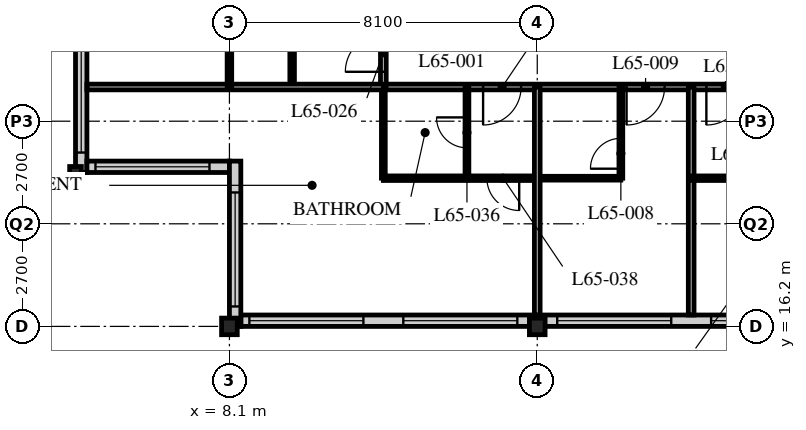
"""IFC4 building model, lengths in metres.
Left out: names, types, materials, properties, quantities, classifications, styles, units other than length and angle.
Written with IfcOpenShell. Run it as: python <this file> out.ifc"""

import sys

from ifc_helpers import new_model, si_unit, direction, frame, frame_2d, origin, origin_2d, place, context, subcontext, project, spatial, rectangle, i_section, extrude, element, fill, save


model = new_model("IFC4")
c1 = context("Model", 3, precision=1e-05, world=origin(), true_north=direction((0.0, 1.0)))
c2 = subcontext(c1, "Body", "Model", "MODEL_VIEW")
j1 = project(units=[si_unit("LENGTHUNIT", "METRE"), si_unit("PLANEANGLEUNIT", "RADIAN")], contexts=[c1])
p1 = place(None, origin())
s1 = spatial("IfcSite", under=j1, at=p1, CompositionType="ELEMENT")
p2 = place(p1, origin())
s2 = spatial("IfcBuilding", under=s1, at=p2, CompositionType="ELEMENT")
p3 = place(p2, frame((0.0, 0.0, 254.1)))
s3 = spatial("IfcBuildingStorey", under=s2, at=p3, CompositionType="ELEMENT", Elevation=254.1)
p4 = place(p3, frame((4.05, 20.25, 0.0), z_axis=(0.0, 0.0, 1.0), x_axis=(1.0, 0.0, 0.0)))
e1 = element("IfcColumn", 1, at=p4, inside=s3, PredefinedType="COLUMN", context=c2, shape_type="SweptSolid", body=[
    extrude(i_section(OverallWidth=0.307, OverallDepth=0.314, WebThickness=0.012, FlangeThickness=0.019, FilletRadius=0.015, at=origin_2d()), origin(), (0.0, 0.0, 1.0), 3.9),
])
for number, where, z_axis, x_axis in (
    (2, (8.1, 16.2, 0.0), (0.0, 0.0, 1.0), (1.0, 0.0, 0.0)),
    (3, (16.2, 16.2, 0.0), (0.0, 0.0, 1.0), (1.0, 0.0, 0.0)),
):
    element("IfcColumn", number, at=place(p3, frame(where, z_axis=z_axis, x_axis=x_axis)), inside=s3, PredefinedType="COLUMN", context=c2, shape_type="SweptSolid", body=[
        extrude(i_section(OverallWidth=0.412, OverallDepth=0.437, WebThickness=0.036, FlangeThickness=0.058, FilletRadius=0.015, at=origin_2d()), origin(), (0.0, 0.0, 1.0), 3.9),
    ])
p5 = place(p3, frame((8.4, 16.35, 0.0), z_axis=(0.0, 0.0, 1.0), x_axis=(1.0, 0.0, 0.0)))
e4 = element("IfcWall", 4, at=p5, inside=s3, PredefinedType="SOLIDWALL", context=c2, shape_type="SweptSolid", body=[
    extrude(rectangle(XDim=40.2, YDim=0.3, at=frame_2d((20.1, 0.0))), origin(), (0.0, 0.0, 1.0), 3.69),
])
p6 = place(p5, frame((0.225, 0.0, 0.6)))
e5 = element("IfcOpeningElement", 5, at=p6, cuts=e4, PredefinedType="OPENING", context=c2, shape_type="SweptSolid", body=[
    extrude(rectangle(XDim=3.0, YDim=2.4, at=frame_2d((1.5, 1.2))), frame((0.0, 0.16, 0.0), z_axis=(0.0, -1.0, 0.0), x_axis=(1.0, 0.0, 0.0)), (0.0, 0.0, 1.0), 0.32),
])
p7 = place(p5, frame((4.275, 0.0, 0.6)))
e6 = element("IfcOpeningElement", 6, at=p7, cuts=e4, PredefinedType="OPENING", context=c2, shape_type="SweptSolid", body=[
    extrude(rectangle(XDim=3.0, YDim=2.4, at=frame_2d((1.5, 1.2))), frame((0.0, 0.16, 0.0), z_axis=(0.0, -1.0, 0.0), x_axis=(1.0, 0.0, 0.0)), (0.0, 0.0, 1.0), 0.32),
])
p8 = place(p5, frame((8.325, 0.0, 0.6)))
e7 = element("IfcOpeningElement", 7, at=p8, cuts=e4, PredefinedType="OPENING", context=c2, shape_type="SweptSolid", body=[
    extrude(rectangle(XDim=3.0, YDim=2.4, at=frame_2d((1.5, 1.2))), frame((0.0, 0.16, 0.0), z_axis=(0.0, -1.0, 0.0), x_axis=(1.0, 0.0, 0.0)), (0.0, 0.0, 1.0), 0.32),
])
p9 = place(p5, frame((12.375, 0.0, 0.6)))
e8 = element("IfcOpeningElement", 8, at=p9, cuts=e4, PredefinedType="OPENING", context=c2, shape_type="SweptSolid", body=[
    extrude(rectangle(XDim=3.0, YDim=2.4, at=frame_2d((1.5, 1.2))), frame((0.0, 0.16, 0.0), z_axis=(0.0, -1.0, 0.0), x_axis=(1.0, 0.0, 0.0)), (0.0, 0.0, 1.0), 0.32),
])
p10 = place(p5, frame((16.425, 0.0, 0.6)))
e9 = element("IfcOpeningElement", 9, at=p10, cuts=e4, PredefinedType="OPENING", context=c2, shape_type="SweptSolid", body=[
    extrude(rectangle(XDim=3.0, YDim=2.4, at=frame_2d((1.5, 1.2))), frame((0.0, 0.16, 0.0), z_axis=(0.0, -1.0, 0.0), x_axis=(1.0, 0.0, 0.0)), (0.0, 0.0, 1.0), 0.32),
])
p11 = place(p5, frame((20.475, 0.0, 0.6)))
e10 = element("IfcOpeningElement", 10, at=p11, cuts=e4, PredefinedType="OPENING", context=c2, shape_type="SweptSolid", body=[
    extrude(rectangle(XDim=3.0, YDim=2.4, at=frame_2d((1.5, 1.2))), frame((0.0, 0.16, 0.0), z_axis=(0.0, -1.0, 0.0), x_axis=(1.0, 0.0, 0.0)), (0.0, 0.0, 1.0), 0.32),
])
p12 = place(p5, frame((24.525, 0.0, 0.6)))
e11 = element("IfcOpeningElement", 11, at=p12, cuts=e4, PredefinedType="OPENING", context=c2, shape_type="SweptSolid", body=[
    extrude(rectangle(XDim=3.0, YDim=2.4, at=frame_2d((1.5, 1.2))), frame((0.0, 0.16, 0.0), z_axis=(0.0, -1.0, 0.0), x_axis=(1.0, 0.0, 0.0)), (0.0, 0.0, 1.0), 0.32),
])
p13 = place(p5, frame((28.575, 0.0, 0.6)))
e12 = element("IfcOpeningElement", 12, at=p13, cuts=e4, PredefinedType="OPENING", context=c2, shape_type="SweptSolid", body=[
    extrude(rectangle(XDim=3.0, YDim=2.4, at=frame_2d((1.5, 1.2))), frame((0.0, 0.16, 0.0), z_axis=(0.0, -1.0, 0.0), x_axis=(1.0, 0.0, 0.0)), (0.0, 0.0, 1.0), 0.32),
])
p14 = place(p5, frame((32.625, 0.0, 0.6)))
e13 = element("IfcOpeningElement", 13, at=p14, cuts=e4, PredefinedType="OPENING", context=c2, shape_type="SweptSolid", body=[
    extrude(rectangle(XDim=3.0, YDim=2.4, at=frame_2d((1.5, 1.2))), frame((0.0, 0.16, 0.0), z_axis=(0.0, -1.0, 0.0), x_axis=(1.0, 0.0, 0.0)), (0.0, 0.0, 1.0), 0.32),
])
p15 = place(p5, frame((36.675, 0.0, 0.6)))
e14 = element("IfcOpeningElement", 14, at=p15, cuts=e4, PredefinedType="OPENING", context=c2, shape_type="SweptSolid", body=[
    extrude(rectangle(XDim=3.0, YDim=2.4, at=frame_2d((1.5, 1.2))), frame((0.0, 0.16, 0.0), z_axis=(0.0, -1.0, 0.0), x_axis=(1.0, 0.0, 0.0)), (0.0, 0.0, 1.0), 0.32),
])
p16 = place(p3, frame((4.2, 24.6, 0.0), z_axis=(0.0, 0.0, 1.0), x_axis=(0.0, -1.0, 0.0)))
e15 = element("IfcWall", 15, at=p16, inside=s3, PredefinedType="SOLIDWALL", context=c2, shape_type="SweptSolid", body=[
    extrude(rectangle(XDim=4.35, YDim=0.3, at=frame_2d((2.175, 0.0))), origin(), (0.0, 0.0, 1.0), 3.69),
])
p17 = place(p16, frame((0.825, 0.0, 0.6)))
e16 = element("IfcOpeningElement", 16, at=p17, cuts=e15, PredefinedType="OPENING", context=c2, shape_type="SweptSolid", body=[
    extrude(rectangle(XDim=3.0, YDim=2.3, at=frame_2d((1.5, 1.15))), frame((0.0, 0.16, 0.0), z_axis=(0.0, -1.0, 0.0), x_axis=(1.0, 0.0, 0.0)), (0.0, 0.0, 1.0), 0.32),
])
p18 = place(p3, frame((4.35, 20.4, 0.0), z_axis=(0.0, 0.0, 1.0), x_axis=(1.0, 0.0, 0.0)))
e17 = element("IfcWall", 17, at=p18, inside=s3, PredefinedType="SOLIDWALL", context=c2, shape_type="SweptSolid", body=[
    extrude(rectangle(XDim=3.75, YDim=0.3, at=frame_2d((1.875, 0.0))), origin(), (0.0, 0.0, 1.0), 3.69),
])
p19 = place(p18, frame((0.225, 0.0, 0.6)))
e18 = element("IfcOpeningElement", 18, at=p19, cuts=e17, PredefinedType="OPENING", context=c2, shape_type="SweptSolid", body=[
    extrude(rectangle(XDim=3.0, YDim=2.3, at=frame_2d((1.5, 1.15))), frame((0.0, 0.16, 0.0), z_axis=(0.0, -1.0, 0.0), x_axis=(1.0, 0.0, 0.0)), (0.0, 0.0, 1.0), 0.32),
])
p20 = place(p3, frame((8.25, 20.55, 0.0), z_axis=(0.0, 0.0, 1.0), x_axis=(0.0, -1.0, 0.0)))
e19 = element("IfcWall", 19, at=p20, inside=s3, PredefinedType="SOLIDWALL", context=c2, shape_type="SweptSolid", body=[
    extrude(rectangle(XDim=4.35, YDim=0.3, at=frame_2d((2.175, 0.0))), origin(), (0.0, 0.0, 1.0), 3.69),
])
p21 = place(p20, frame((0.825, 0.0, 0.6)))
e20 = element("IfcOpeningElement", 20, at=p21, cuts=e19, PredefinedType="OPENING", context=c2, shape_type="SweptSolid", body=[
    extrude(rectangle(XDim=3.0, YDim=2.3, at=frame_2d((1.5, 1.15))), frame((0.0, 0.16, 0.0), z_axis=(0.0, -1.0, 0.0), x_axis=(1.0, 0.0, 0.0)), (0.0, 0.0, 1.0), 0.32),
])
p22 = place(p3, frame((12.15, 22.5, 0.0), z_axis=(0.0, 0.0, 1.0), x_axis=(1.0, 0.0, 0.0)))
e21 = element("IfcWall", 21, at=p22, inside=s3, PredefinedType="PARTITIONING", context=c2, shape_type="SweptSolid", body=[
    extrude(rectangle(XDim=24.3, YDim=0.15, at=frame_2d((12.15, 0.0))), origin(), (0.0, 0.0, 1.0), 3.69),
])
p23 = place(p22, frame((6.4, 0.0, 0.0)))
e22 = element("IfcOpeningElement", 22, at=p23, cuts=e21, PredefinedType="OPENING", context=c2, shape_type="SweptSolid", body=[
    extrude(rectangle(XDim=1.0, YDim=2.1, at=frame_2d((0.5, 1.05))), frame((0.0, 0.085, 0.0), z_axis=(0.0, -1.0, 0.0), x_axis=(1.0, 0.0, 0.0)), (0.0, 0.0, 1.0), 0.17),
])
p24 = place(p22, frame((8.5, 0.0, 0.0)))
e23 = element("IfcOpeningElement", 23, at=p24, cuts=e21, PredefinedType="OPENING", context=c2, shape_type="SweptSolid", body=[
    extrude(rectangle(XDim=1.0, YDim=2.1, at=frame_2d((0.5, 1.05))), frame((0.0, 0.085, 0.0), z_axis=(0.0, -1.0, 0.0), x_axis=(1.0, 0.0, 0.0)), (0.0, 0.0, 1.0), 0.17),
])
p25 = place(p22, frame((16.6, 0.0, 0.0)))
e24 = element("IfcOpeningElement", 24, at=p25, cuts=e21, PredefinedType="OPENING", context=c2, shape_type="SweptSolid", body=[
    extrude(rectangle(XDim=1.0, YDim=2.1, at=frame_2d((0.5, 1.05))), frame((0.0, 0.085, 0.0), z_axis=(0.0, -1.0, 0.0), x_axis=(1.0, 0.0, 0.0)), (0.0, 0.0, 1.0), 0.17),
])
p26 = place(p22, frame((2.625, 0.0, 0.0)))
e25 = element("IfcOpeningElement", 25, at=p26, cuts=e21, PredefinedType="OPENING", context=c2, shape_type="SweptSolid", body=[
    extrude(rectangle(XDim=1.0, YDim=2.1, at=frame_2d((0.5, 1.05))), frame((0.0, 0.085, 0.0), z_axis=(0.0, -1.0, 0.0), x_axis=(1.0, 0.0, 0.0)), (0.0, 0.0, 1.0), 0.17),
])
p27 = place(p3, frame((12.15, 22.5, 0.0), z_axis=(0.0, 0.0, 1.0), x_axis=(0.0, 1.0, 0.0)))
e26 = element("IfcWall", 26, at=p27, inside=s3, PredefinedType="PARTITIONING", context=c2, shape_type="SweptSolid", body=[
    extrude(rectangle(XDim=30.15, YDim=0.15, at=frame_2d((15.075, 0.0))), origin(), (0.0, 0.0, 1.0), 3.69),
])
p28 = place(p27, frame((0.4, 0.0, 0.0)))
e27 = element("IfcOpeningElement", 27, at=p28, cuts=e26, PredefinedType="OPENING", context=c2, shape_type="SweptSolid", body=[
    extrude(rectangle(XDim=1.0, YDim=2.1, at=frame_2d((0.5, 1.05))), frame((0.0, 0.085, 0.0), z_axis=(0.0, -1.0, 0.0), x_axis=(1.0, 0.0, 0.0)), (0.0, 0.0, 1.0), 0.17),
])
p29 = place(p27, frame((24.4, 0.0, 0.0)))
e28 = element("IfcOpeningElement", 28, at=p29, cuts=e26, PredefinedType="OPENING", context=c2, shape_type="SweptSolid", body=[
    extrude(rectangle(XDim=1.0, YDim=2.1, at=frame_2d((0.5, 1.05))), frame((0.0, 0.085, 0.0), z_axis=(0.0, -1.0, 0.0), x_axis=(1.0, 0.0, 0.0)), (0.0, 0.0, 1.0), 0.17),
])
p30 = place(p27, frame((28.45, 0.0, 0.0)))
e29 = element("IfcOpeningElement", 29, at=p30, cuts=e26, PredefinedType="OPENING", context=c2, shape_type="SweptSolid", body=[
    extrude(rectangle(XDim=1.0, YDim=2.1, at=frame_2d((0.5, 1.05))), frame((0.0, 0.085, 0.0), z_axis=(0.0, -1.0, 0.0), x_axis=(1.0, 0.0, 0.0)), (0.0, 0.0, 1.0), 0.17),
])
p31 = place(p3, frame((16.2, 20.1, 0.0), z_axis=(0.0, 0.0, 1.0), x_axis=(1.0, 0.0, 0.0)))
e30 = element("IfcWall", 30, at=p31, inside=s3, PredefinedType="PARTITIONING", context=c2, shape_type="SweptSolid", body=[
    extrude(rectangle(XDim=2.2, YDim=0.1, at=frame_2d((1.1, 0.0))), origin(), (0.0, 0.0, 1.0), 3.69),
])
p32 = place(p3, frame((18.4, 22.5, 0.0), z_axis=(0.0, 0.0, 1.0), x_axis=(0.0, -1.0, 0.0)))
e31 = element("IfcWall", 31, at=p32, inside=s3, PredefinedType="PARTITIONING", context=c2, shape_type="SweptSolid", body=[
    extrude(rectangle(XDim=2.4, YDim=0.1, at=frame_2d((1.2, 0.0))), origin(), (0.0, 0.0, 1.0), 3.69),
])
p33 = place(p32, frame((1.35, 0.0, 0.0)))
e32 = element("IfcOpeningElement", 32, at=p33, cuts=e31, PredefinedType="OPENING", context=c2, shape_type="SweptSolid", body=[
    extrude(rectangle(XDim=0.8, YDim=2.1, at=frame_2d((0.4, 1.05))), frame((0.0, 0.06, 0.0), z_axis=(0.0, -1.0, 0.0), x_axis=(1.0, 0.0, 0.0)), (0.0, 0.0, 1.0), 0.12),
])
p34 = place(p3, frame((20.25, 22.5, 0.0), z_axis=(0.0, 0.0, 1.0), x_axis=(0.0, -1.0, 0.0)))
e33 = element("IfcWall", 33, at=p34, inside=s3, PredefinedType="PARTITIONING", context=c2, shape_type="SweptSolid", body=[
    extrude(rectangle(XDim=6.0, YDim=0.15, at=frame_2d((3.0, 0.0))), origin(), (0.0, 0.0, 1.0), 3.69),
])
p35 = place(p3, frame((20.25, 20.1, 0.0), z_axis=(0.0, 0.0, 1.0), x_axis=(1.0, 0.0, 0.0)))
e34 = element("IfcWall", 34, at=p35, inside=s3, PredefinedType="PARTITIONING", context=c2, shape_type="SweptSolid", body=[
    extrude(rectangle(XDim=16.2, YDim=0.12, at=frame_2d((8.1, 0.0))), origin(), (0.0, 0.0, 1.0), 3.69),
])
p36 = place(p35, frame((0.975, 0.0, 0.0)))
e35 = element("IfcOpeningElement", 35, at=p36, cuts=e34, PredefinedType="OPENING", context=c2, shape_type="SweptSolid", body=[
    extrude(rectangle(XDim=0.85, YDim=2.1, at=frame_2d((0.425, 1.05))), frame((0.0, 0.07, 0.0), z_axis=(0.0, -1.0, 0.0), x_axis=(1.0, 0.0, 0.0)), (0.0, 0.0, 1.0), 0.14),
])
p37 = place(p35, frame((4.375, 0.0, 0.0)))
e36 = element("IfcOpeningElement", 36, at=p37, cuts=e34, PredefinedType="OPENING", context=c2, shape_type="SweptSolid", body=[
    extrude(rectangle(XDim=0.85, YDim=2.1, at=frame_2d((0.425, 1.05))), frame((0.0, 0.07, 0.0), z_axis=(0.0, -1.0, 0.0), x_axis=(1.0, 0.0, 0.0)), (0.0, 0.0, 1.0), 0.14),
])
p38 = place(p35, frame((9.075, 0.0, 0.0)))
e37 = element("IfcOpeningElement", 37, at=p38, cuts=e34, PredefinedType="OPENING", context=c2, shape_type="SweptSolid", body=[
    extrude(rectangle(XDim=0.85, YDim=2.1, at=frame_2d((0.425, 1.05))), frame((0.0, 0.07, 0.0), z_axis=(0.0, -1.0, 0.0), x_axis=(1.0, 0.0, 0.0)), (0.0, 0.0, 1.0), 0.14),
])
p39 = place(p35, frame((12.475, 0.0, 0.0)))
e38 = element("IfcOpeningElement", 38, at=p39, cuts=e34, PredefinedType="OPENING", context=c2, shape_type="SweptSolid", body=[
    extrude(rectangle(XDim=0.85, YDim=2.1, at=frame_2d((0.425, 1.05))), frame((0.0, 0.07, 0.0), z_axis=(0.0, -1.0, 0.0), x_axis=(1.0, 0.0, 0.0)), (0.0, 0.0, 1.0), 0.14),
])
p40 = place(p3, frame((9.75, 22.5, 0.0), z_axis=(0.0, 0.0, 1.0), x_axis=(0.0, 1.0, 0.0)))
e39 = element("IfcWall", 39, at=p40, inside=s3, PredefinedType="PARTITIONING", context=c2, shape_type="SweptSolid", body=[
    extrude(rectangle(XDim=22.05, YDim=0.12, at=frame_2d((11.025, 0.0))), origin(), (0.0, 0.0, 1.0), 3.69),
])
p41 = place(p40, frame((0.975, 0.0, 0.0)))
e40 = element("IfcOpeningElement", 40, at=p41, cuts=e39, PredefinedType="OPENING", context=c2, shape_type="SweptSolid", body=[
    extrude(rectangle(XDim=0.85, YDim=2.1, at=frame_2d((0.425, 1.05))), frame((0.0, 0.07, 0.0), z_axis=(0.0, -1.0, 0.0), x_axis=(1.0, 0.0, 0.0)), (0.0, 0.0, 1.0), 0.14),
])
p42 = place(p40, frame((10.225, 0.0, 0.0)))
e41 = element("IfcOpeningElement", 41, at=p42, cuts=e39, PredefinedType="OPENING", context=c2, shape_type="SweptSolid", body=[
    extrude(rectangle(XDim=0.85, YDim=2.1, at=frame_2d((0.425, 1.05))), frame((0.0, 0.07, 0.0), z_axis=(0.0, -1.0, 0.0), x_axis=(1.0, 0.0, 0.0)), (0.0, 0.0, 1.0), 0.14),
])
p43 = place(p40, frame((14.275, 0.0, 0.0)))
e42 = element("IfcOpeningElement", 42, at=p43, cuts=e39, PredefinedType="OPENING", context=c2, shape_type="SweptSolid", body=[
    extrude(rectangle(XDim=0.85, YDim=2.1, at=frame_2d((0.425, 1.05))), frame((0.0, 0.07, 0.0), z_axis=(0.0, -1.0, 0.0), x_axis=(1.0, 0.0, 0.0)), (0.0, 0.0, 1.0), 0.14),
])
p44 = place(p40, frame((18.325, 0.0, 0.0)))
e43 = element("IfcOpeningElement", 43, at=p44, cuts=e39, PredefinedType="OPENING", context=c2, shape_type="SweptSolid", body=[
    extrude(rectangle(XDim=0.85, YDim=2.1, at=frame_2d((0.425, 1.05))), frame((0.0, 0.07, 0.0), z_axis=(0.0, -1.0, 0.0), x_axis=(1.0, 0.0, 0.0)), (0.0, 0.0, 1.0), 0.14),
])
p45 = place(p3, frame((12.15, 20.1, 0.0), z_axis=(0.0, 0.0, 1.0), x_axis=(1.0, 0.0, 0.0)))
e44 = element("IfcWall", 44, at=p45, inside=s3, PredefinedType="PARTITIONING", context=c2, shape_type="SweptSolid", body=[
    extrude(rectangle(XDim=4.05, YDim=0.12, at=frame_2d((2.025, 0.0))), origin(), (0.0, 0.0, 1.0), 3.69),
])
p46 = place(p45, frame((2.725, 0.0, 0.0)))
e45 = element("IfcOpeningElement", 45, at=p46, cuts=e44, PredefinedType="OPENING", context=c2, shape_type="SweptSolid", body=[
    extrude(rectangle(XDim=0.85, YDim=2.1, at=frame_2d((0.425, 1.05))), frame((0.0, 0.07, 0.0), z_axis=(0.0, -1.0, 0.0), x_axis=(1.0, 0.0, 0.0)), (0.0, 0.0, 1.0), 0.14),
])
p47 = place(p3, frame((14.35, 22.5, 0.0), z_axis=(0.0, 0.0, 1.0), x_axis=(0.0, -1.0, 0.0)))
e46 = element("IfcWall", 46, at=p47, inside=s3, PredefinedType="PARTITIONING", context=c2, shape_type="SweptSolid", body=[
    extrude(rectangle(XDim=2.4, YDim=0.1, at=frame_2d((1.2, 0.0))), origin(), (0.0, 0.0, 1.0), 3.69),
])
p48 = place(p47, frame((0.8, 0.0, 0.0)))
e47 = element("IfcOpeningElement", 47, at=p48, cuts=e46, PredefinedType="OPENING", context=c2, shape_type="SweptSolid", body=[
    extrude(rectangle(XDim=0.8, YDim=2.1, at=frame_2d((0.4, 1.05))), frame((0.0, 0.06, 0.0), z_axis=(0.0, -1.0, 0.0), x_axis=(1.0, 0.0, 0.0)), (0.0, 0.0, 1.0), 0.12),
])
p49 = place(p3, frame((12.15, 22.5, 0.0), z_axis=(0.0, 0.0, 1.0), x_axis=(0.0, -1.0, 0.0)))
e48 = element("IfcWall", 48, at=p49, inside=s3, PredefinedType="PARTITIONING", context=c2, shape_type="SweptSolid", body=[
    extrude(rectangle(XDim=2.4, YDim=0.1, at=frame_2d((1.2, 0.0))), origin(), (0.0, 0.0, 1.0), 3.69),
])
p50 = place(p3, frame((4.35, 22.5, 0.0), z_axis=(0.0, 0.0, 1.0), x_axis=(1.0, 0.0, 0.0)))
e49 = element("IfcWall", 49, at=p50, inside=s3, PredefinedType="PARTITIONING", context=c2, shape_type="SweptSolid", body=[
    extrude(rectangle(XDim=7.8, YDim=0.15, at=frame_2d((3.9, 0.0))), origin(), (0.0, 0.0, 1.0), 3.69),
])
p51 = place(p3, frame((16.2, 22.5, 0.0), z_axis=(0.0, 0.0, 1.0), x_axis=(0.0, -1.0, 0.0)))
e50 = element("IfcWall", 50, at=p51, inside=s3, PredefinedType="PARTITIONING", context=c2, shape_type="SweptSolid", body=[
    extrude(rectangle(XDim=6.0, YDim=0.15, at=frame_2d((3.0, 0.0))), origin(), (0.0, 0.0, 1.0), 3.078),
])
p52 = place(p3, frame((8.1, 22.5, 0.0), z_axis=(0.0, 0.0, 1.0), x_axis=(0.0, 1.0, 0.0)))
e51 = element("IfcWall", 51, at=p52, inside=s3, PredefinedType="PARTITIONING", context=c2, shape_type="SweptSolid", body=[
    extrude(rectangle(XDim=1.597, YDim=0.12, at=frame_2d((0.798, 0.0))), origin(), (0.0, 0.0, 1.0), 3.078),
])
p53 = place(p6, origin())
e52 = element("IfcWindow", 52, at=p53, inside=s3, PartitioningType="SINGLE_PANEL", PredefinedType="WINDOW", context=c2, shape_type="SweptSolid", body=[
    extrude(rectangle(XDim=3.0, YDim=2.4, at=frame_2d((1.5, 1.2))), frame((0.0, 0.03, 0.0), z_axis=(0.0, -1.0, 0.0), x_axis=(1.0, 0.0, 0.0)), (0.0, 0.0, 1.0), 0.06),
])
fill(e5, e52)
p54 = place(p7, origin())
e53 = element("IfcWindow", 53, at=p54, inside=s3, PartitioningType="SINGLE_PANEL", PredefinedType="WINDOW", context=c2, shape_type="SweptSolid", body=[
    extrude(rectangle(XDim=3.0, YDim=2.4, at=frame_2d((1.5, 1.2))), frame((0.0, 0.03, 0.0), z_axis=(0.0, -1.0, 0.0), x_axis=(1.0, 0.0, 0.0)), (0.0, 0.0, 1.0), 0.06),
])
fill(e6, e53)
p55 = place(p8, origin())
e54 = element("IfcWindow", 54, at=p55, inside=s3, PartitioningType="SINGLE_PANEL", PredefinedType="WINDOW", context=c2, shape_type="SweptSolid", body=[
    extrude(rectangle(XDim=3.0, YDim=2.4, at=frame_2d((1.5, 1.2))), frame((0.0, 0.03, 0.0), z_axis=(0.0, -1.0, 0.0), x_axis=(1.0, 0.0, 0.0)), (0.0, 0.0, 1.0), 0.06),
])
fill(e7, e54)
p56 = place(p9, origin())
e55 = element("IfcWindow", 55, at=p56, inside=s3, PartitioningType="SINGLE_PANEL", PredefinedType="WINDOW", context=c2, shape_type="SweptSolid", body=[
    extrude(rectangle(XDim=3.0, YDim=2.4, at=frame_2d((1.5, 1.2))), frame((0.0, 0.03, 0.0), z_axis=(0.0, -1.0, 0.0), x_axis=(1.0, 0.0, 0.0)), (0.0, 0.0, 1.0), 0.06),
])
fill(e8, e55)
p57 = place(p17, origin())
e56 = element("IfcWindow", 56, at=p57, inside=s3, PartitioningType="SINGLE_PANEL", PredefinedType="WINDOW", context=c2, shape_type="SweptSolid", body=[
    extrude(rectangle(XDim=3.0, YDim=2.3, at=frame_2d((1.5, 1.15))), frame((0.0, 0.03, 0.0), z_axis=(0.0, -1.0, 0.0), x_axis=(1.0, 0.0, 0.0)), (0.0, 0.0, 1.0), 0.06),
])
fill(e16, e56)
p58 = place(p19, origin())
e57 = element("IfcWindow", 57, at=p58, inside=s3, PartitioningType="SINGLE_PANEL", PredefinedType="WINDOW", context=c2, shape_type="SweptSolid", body=[
    extrude(rectangle(XDim=3.0, YDim=2.3, at=frame_2d((1.5, 1.15))), frame((0.0, 0.03, 0.0), z_axis=(0.0, -1.0, 0.0), x_axis=(1.0, 0.0, 0.0)), (0.0, 0.0, 1.0), 0.06),
])
fill(e18, e57)
p59 = place(p21, origin())
e58 = element("IfcWindow", 58, at=p59, inside=s3, PartitioningType="SINGLE_PANEL", PredefinedType="WINDOW", context=c2, shape_type="SweptSolid", body=[
    extrude(rectangle(XDim=3.0, YDim=2.3, at=frame_2d((1.5, 1.15))), frame((0.0, 0.03, 0.0), z_axis=(0.0, -1.0, 0.0), x_axis=(1.0, 0.0, 0.0)), (0.0, 0.0, 1.0), 0.06),
])
fill(e20, e58)
p60 = place(p33, origin())
e59 = element("IfcDoor", 59, at=p60, inside=s3, OperationType="SINGLE_SWING_LEFT", PredefinedType="DOOR", context=c2, shape_type="SweptSolid", body=[
    extrude(rectangle(XDim=0.8, YDim=2.1, at=frame_2d((0.4, 1.05))), frame((0.0, 0.025, 0.0), z_axis=(0.0, -1.0, 0.0), x_axis=(1.0, 0.0, 0.0)), (0.0, 0.0, 1.0), 0.05),
])
fill(e32, e59)
p61 = place(p23, origin())
e60 = element("IfcDoor", 60, at=p61, inside=s3, OperationType="SINGLE_SWING_RIGHT", PredefinedType="DOOR", context=c2, shape_type="SweptSolid", body=[
    extrude(rectangle(XDim=1.0, YDim=2.1, at=frame_2d((0.5, 1.05))), frame((0.0, 0.025, 0.0), z_axis=(0.0, -1.0, 0.0), x_axis=(1.0, 0.0, 0.0)), (0.0, 0.0, 1.0), 0.05),
])
fill(e22, e60)
p62 = place(p24, origin())
e61 = element("IfcDoor", 61, at=p62, inside=s3, OperationType="SINGLE_SWING_RIGHT", PredefinedType="DOOR", context=c2, shape_type="SweptSolid", body=[
    extrude(rectangle(XDim=1.0, YDim=2.1, at=frame_2d((0.5, 1.05))), frame((0.0, 0.025, 0.0), z_axis=(0.0, -1.0, 0.0), x_axis=(1.0, 0.0, 0.0)), (0.0, 0.0, 1.0), 0.05),
])
fill(e23, e61)
p63 = place(p28, origin())
e62 = element("IfcDoor", 62, at=p63, inside=s3, OperationType="SINGLE_SWING_LEFT", PredefinedType="DOOR", context=c2, shape_type="SweptSolid", body=[
    extrude(rectangle(XDim=1.0, YDim=2.1, at=frame_2d((0.5, 1.05))), frame((0.0, 0.025, 0.0), z_axis=(0.0, -1.0, 0.0), x_axis=(1.0, 0.0, 0.0)), (0.0, 0.0, 1.0), 0.05),
])
fill(e27, e62)
p64 = place(p48, origin())
e63 = element("IfcDoor", 63, at=p64, inside=s3, OperationType="SINGLE_SWING_RIGHT", PredefinedType="DOOR", context=c2, shape_type="SweptSolid", body=[
    extrude(rectangle(XDim=0.8, YDim=2.1, at=frame_2d((0.4, 1.05))), frame((0.0, 0.025, 0.0), z_axis=(0.0, -1.0, 0.0), x_axis=(1.0, 0.0, 0.0)), (0.0, 0.0, 1.0), 0.05),
])
fill(e47, e63)
p65 = place(p26, origin())
e64 = element("IfcDoor", 64, at=p65, inside=s3, OperationType="SINGLE_SWING_RIGHT", PredefinedType="DOOR", context=c2, shape_type="SweptSolid", body=[
    extrude(rectangle(XDim=1.0, YDim=2.1, at=frame_2d((0.5, 1.05))), frame((0.0, 0.025, 0.0), z_axis=(0.0, -1.0, 0.0), x_axis=(1.0, 0.0, 0.0)), (0.0, 0.0, 1.0), 0.05),
])
fill(e25, e64)
p66 = place(p46, origin())
e65 = element("IfcDoor", 65, at=p66, inside=s3, OperationType="SINGLE_SWING_LEFT", PredefinedType="DOOR", context=c2, shape_type="SweptSolid", body=[
    extrude(rectangle(XDim=0.85, YDim=2.1, at=frame_2d((0.425, 1.05))), frame((0.0, 0.025, 0.0), z_axis=(0.0, -1.0, 0.0), x_axis=(1.0, 0.0, 0.0)), (0.0, 0.0, 1.0), 0.05),
])
fill(e45, e65)
save(model, sys.argv[1])
